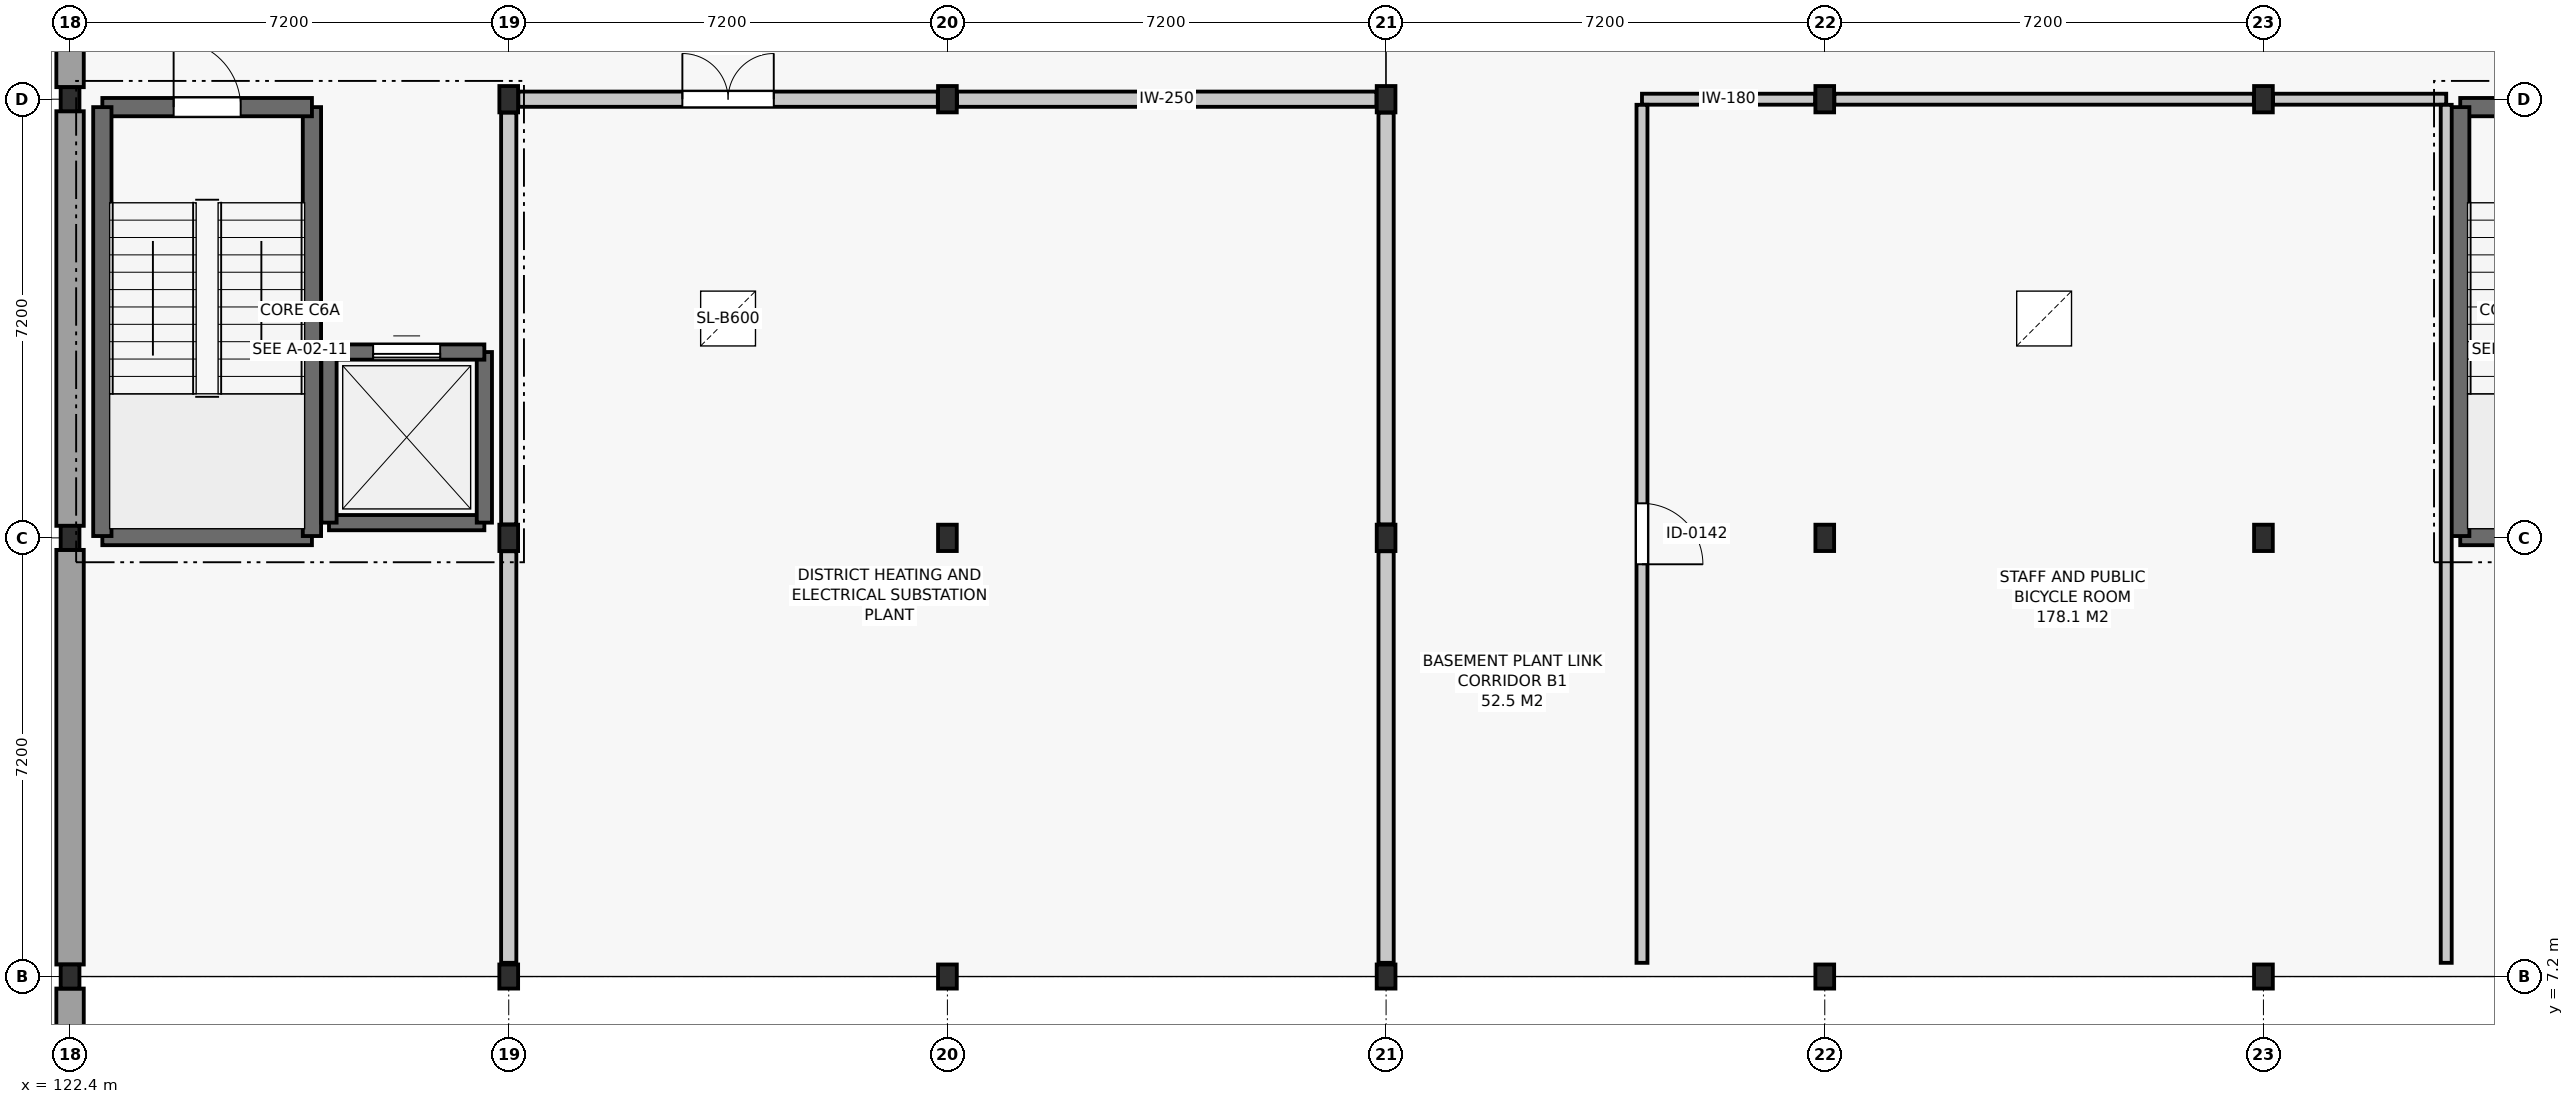
"""IFC4 building model, lengths in metres.
Left out: names, types, materials, properties, quantities, classifications, styles, units other than length and angle.
Written with IfcOpenShell. Run it as: python <this file> out.ifc"""

import sys

from ifc_helpers import new_model, si_unit, direction, frame, frame_2d, origin, origin_2d, place, context, subcontext, project, spatial, rectangle, i_section, extrude, element, fill, save


model = new_model("IFC4")
c1 = context("Model", 3, precision=1e-05, world=origin(), true_north=direction((0.0, 1.0)))
c2 = subcontext(c1, "Body", "Model", "MODEL_VIEW")
j1 = project(units=[si_unit("LENGTHUNIT", "METRE"), si_unit("PLANEANGLEUNIT", "RADIAN")], contexts=[c1])
p1 = place(None, origin())
s1 = spatial("IfcSite", under=j1, at=p1, CompositionType="ELEMENT")
p2 = place(p1, origin())
s2 = spatial("IfcBuilding", under=s1, at=p2, CompositionType="ELEMENT")
p3 = place(p2, frame((0.0, 0.0, -4.2)))
s3 = spatial("IfcBuildingStorey", under=s2, at=p3, CompositionType="ELEMENT", Elevation=-4.2)
for number, where, z_axis, x_axis in (
    (1, (122.4, 7.2, 0.0), (0.0, 0.0, 1.0), (1.0, 0.0, 0.0)),
    (2, (122.4, 14.4, 0.0), (0.0, 0.0, 1.0), (1.0, 0.0, 0.0)),
    (3, (122.4, 21.6, 0.0), (0.0, 0.0, 1.0), (1.0, 0.0, 0.0)),
    (4, (129.6, 7.2, 0.0), (0.0, 0.0, 1.0), (1.0, 0.0, 0.0)),
):
    element("IfcColumn", number, at=place(p3, frame(where, z_axis=z_axis, x_axis=x_axis)), inside=s3, PredefinedType="COLUMN", context=c2, shape_type="SweptSolid", body=[
        extrude(i_section(OverallWidth=0.308, OverallDepth=0.395, WebThickness=0.021, FlangeThickness=0.036, FilletRadius=0.027, at=origin_2d()), origin(), (0.0, 0.0, 1.0), 4.2),
    ])
for number, where, z_axis, x_axis in (
    (5, (129.6, 14.4, 0.0), (0.0, 0.0, 1.0), (1.0, 0.0, 0.0)),
    (6, (129.6, 21.6, 0.0), (0.0, 0.0, 1.0), (1.0, 0.0, 0.0)),
):
    element("IfcColumn", number, at=place(p3, frame(where, z_axis=z_axis, x_axis=x_axis)), inside=s3, PredefinedType="COLUMN", context=c2, shape_type="SweptSolid", body=[
        extrude(i_section(OverallWidth=0.307, OverallDepth=0.432, WebThickness=0.021, FlangeThickness=0.04, FilletRadius=0.027, at=origin_2d()), origin(), (0.0, 0.0, 1.0), 4.2),
    ])
p4 = place(p3, frame((136.8, 7.2, 0.0), z_axis=(0.0, 0.0, 1.0), x_axis=(1.0, 0.0, 0.0)))
e7 = element("IfcColumn", 7, at=p4, inside=s3, PredefinedType="COLUMN", context=c2, shape_type="SweptSolid", body=[
    extrude(i_section(OverallWidth=0.308, OverallDepth=0.395, WebThickness=0.021, FlangeThickness=0.036, FilletRadius=0.027, at=origin_2d()), origin(), (0.0, 0.0, 1.0), 4.2),
])
for number, where, z_axis, x_axis in (
    (8, (136.8, 14.4, 0.0), (0.0, 0.0, 1.0), (1.0, 0.0, 0.0)),
    (9, (136.8, 21.6, 0.0), (0.0, 0.0, 1.0), (1.0, 0.0, 0.0)),
):
    element("IfcColumn", number, at=place(p3, frame(where, z_axis=z_axis, x_axis=x_axis)), inside=s3, PredefinedType="COLUMN", context=c2, shape_type="SweptSolid", body=[
        extrude(i_section(OverallWidth=0.307, OverallDepth=0.432, WebThickness=0.021, FlangeThickness=0.04, FilletRadius=0.027, at=origin_2d()), origin(), (0.0, 0.0, 1.0), 4.2),
    ])
p5 = place(p3, frame((144.0, 7.2, 0.0), z_axis=(0.0, 0.0, 1.0), x_axis=(1.0, 0.0, 0.0)))
e10 = element("IfcColumn", 10, at=p5, inside=s3, PredefinedType="COLUMN", context=c2, shape_type="SweptSolid", body=[
    extrude(i_section(OverallWidth=0.308, OverallDepth=0.395, WebThickness=0.021, FlangeThickness=0.036, FilletRadius=0.027, at=origin_2d()), origin(), (0.0, 0.0, 1.0), 4.2),
])
for number, where, z_axis, x_axis in (
    (11, (144.0, 14.4, 0.0), (0.0, 0.0, 1.0), (1.0, 0.0, 0.0)),
    (12, (144.0, 21.6, 0.0), (0.0, 0.0, 1.0), (1.0, 0.0, 0.0)),
):
    element("IfcColumn", number, at=place(p3, frame(where, z_axis=z_axis, x_axis=x_axis)), inside=s3, PredefinedType="COLUMN", context=c2, shape_type="SweptSolid", body=[
        extrude(i_section(OverallWidth=0.307, OverallDepth=0.432, WebThickness=0.021, FlangeThickness=0.04, FilletRadius=0.027, at=origin_2d()), origin(), (0.0, 0.0, 1.0), 4.2),
    ])
p6 = place(p3, frame((151.2, 7.2, 0.0), z_axis=(0.0, 0.0, 1.0), x_axis=(1.0, 0.0, 0.0)))
e13 = element("IfcColumn", 13, at=p6, inside=s3, PredefinedType="COLUMN", context=c2, shape_type="SweptSolid", body=[
    extrude(i_section(OverallWidth=0.308, OverallDepth=0.395, WebThickness=0.021, FlangeThickness=0.036, FilletRadius=0.027, at=origin_2d()), origin(), (0.0, 0.0, 1.0), 4.2),
])
for number, where, z_axis, x_axis in (
    (14, (151.2, 14.4, 0.0), (0.0, 0.0, 1.0), (1.0, 0.0, 0.0)),
    (15, (151.2, 21.6, 0.0), (0.0, 0.0, 1.0), (1.0, 0.0, 0.0)),
):
    element("IfcColumn", number, at=place(p3, frame(where, z_axis=z_axis, x_axis=x_axis)), inside=s3, PredefinedType="COLUMN", context=c2, shape_type="SweptSolid", body=[
        extrude(i_section(OverallWidth=0.307, OverallDepth=0.432, WebThickness=0.021, FlangeThickness=0.04, FilletRadius=0.027, at=origin_2d()), origin(), (0.0, 0.0, 1.0), 4.2),
    ])
p7 = place(p3, frame((158.4, 7.2, 0.0), z_axis=(0.0, 0.0, 1.0), x_axis=(1.0, 0.0, 0.0)))
e16 = element("IfcColumn", 16, at=p7, inside=s3, PredefinedType="COLUMN", context=c2, shape_type="SweptSolid", body=[
    extrude(i_section(OverallWidth=0.308, OverallDepth=0.395, WebThickness=0.021, FlangeThickness=0.036, FilletRadius=0.027, at=origin_2d()), origin(), (0.0, 0.0, 1.0), 4.2),
])
for number, where, z_axis, x_axis in (
    (17, (158.4, 14.4, 0.0), (0.0, 0.0, 1.0), (1.0, 0.0, 0.0)),
    (18, (158.4, 21.6, 0.0), (0.0, 0.0, 1.0), (1.0, 0.0, 0.0)),
):
    element("IfcColumn", number, at=place(p3, frame(where, z_axis=z_axis, x_axis=x_axis)), inside=s3, PredefinedType="COLUMN", context=c2, shape_type="SweptSolid", body=[
        extrude(i_section(OverallWidth=0.307, OverallDepth=0.432, WebThickness=0.021, FlangeThickness=0.04, FilletRadius=0.027, at=origin_2d()), origin(), (0.0, 0.0, 1.0), 4.2),
    ])
p8 = place(p3, frame((122.4, 0.198, -0.68), z_axis=(0.0, 0.0, 1.0), x_axis=(0.0, 1.0, 0.0)))
e19 = element("IfcWall", 19, at=p8, inside=s3, PredefinedType="USERDEFINED", context=c2, shape_type="SweptSolid", body=[
    extrude(rectangle(XDim=6.805, YDim=0.45, at=frame_2d((3.402, 0.0))), origin(), (0.0, 0.0, 1.0), 3.94),
])
p9 = place(p3, frame((122.4, 7.397, 0.0), z_axis=(0.0, 0.0, 1.0), x_axis=(0.0, 1.0, 0.0)))
e20 = element("IfcWall", 20, at=p9, inside=s3, PredefinedType="USERDEFINED", context=c2, shape_type="SweptSolid", body=[
    extrude(rectangle(XDim=6.805, YDim=0.45, at=frame_2d((3.402, 0.0))), origin(), (0.0, 0.0, 1.0), 3.26),
])
p10 = place(p3, frame((122.4, 14.597, 0.0), z_axis=(0.0, 0.0, 1.0), x_axis=(0.0, 1.0, 0.0)))
e21 = element("IfcWall", 21, at=p10, inside=s3, PredefinedType="USERDEFINED", context=c2, shape_type="SweptSolid", body=[
    extrude(rectangle(XDim=6.805, YDim=0.45, at=frame_2d((3.403, 0.0))), origin(), (0.0, 0.0, 1.0), 3.26),
])
p11 = place(p3, frame((122.4, 21.798, 0.0), z_axis=(0.0, 0.0, 1.0), x_axis=(0.0, 1.0, 0.0)))
e22 = element("IfcWall", 22, at=p11, inside=s3, PredefinedType="USERDEFINED", context=c2, shape_type="SweptSolid", body=[
    extrude(rectangle(XDim=6.805, YDim=0.45, at=frame_2d((3.402, 0.0))), origin(), (0.0, 0.0, 1.0), 3.26),
])
p12 = place(p3, frame((122.93, 14.43, 0.0), z_axis=(0.0, 0.0, 1.0), x_axis=(1.0, 0.0, 0.0)))
e23 = element("IfcWall", 23, at=p12, inside=s3, PredefinedType="SHEAR", context=c2, shape_type="SweptSolid", body=[
    extrude(rectangle(XDim=3.44, YDim=0.3, at=frame_2d((1.72, 0.0))), origin(), (0.0, 0.0, 1.0), 3.88),
])
p13 = place(p3, frame((126.37, 14.43, 0.0), z_axis=(0.0, 0.0, 1.0), x_axis=(0.0, 1.0, 0.0)))
e24 = element("IfcWall", 24, at=p13, inside=s3, PredefinedType="SHEAR", context=c2, shape_type="SweptSolid", body=[
    extrude(rectangle(XDim=7.04, YDim=0.3, at=frame_2d((3.52, 0.0))), origin(), (0.0, 0.0, 1.0), 3.88),
])
p14 = place(p3, frame((126.37, 21.47, 0.0), z_axis=(0.0, 0.0, 1.0), x_axis=(-1.0, 0.0, 0.0)))
e25 = element("IfcWall", 25, at=p14, inside=s3, PredefinedType="SHEAR", context=c2, shape_type="SweptSolid", body=[
    extrude(rectangle(XDim=3.44, YDim=0.3, at=frame_2d((1.72, 0.0))), origin(), (0.0, 0.0, 1.0), 3.88),
])
p15 = place(p14, frame((1.17, 0.0, 0.0)))
e26 = element("IfcOpeningElement", 26, at=p15, cuts=e25, PredefinedType="OPENING", context=c2, shape_type="SweptSolid", body=[
    extrude(rectangle(XDim=1.1, YDim=2.15, at=frame_2d((0.55, 1.075))), frame((0.0, 0.162, 0.0), z_axis=(0.0, -1.0, 0.0), x_axis=(1.0, 0.0, 0.0)), (0.0, 0.0, 1.0), 0.324),
])
p16 = place(p3, frame((122.93, 21.47, 0.0), z_axis=(0.0, 0.0, 1.0), x_axis=(0.0, -1.0, 0.0)))
e27 = element("IfcWall", 27, at=p16, inside=s3, PredefinedType="SHEAR", context=c2, shape_type="SweptSolid", body=[
    extrude(rectangle(XDim=7.04, YDim=0.3, at=frame_2d((3.52, 0.0))), origin(), (0.0, 0.0, 1.0), 3.88),
])
p17 = place(p3, frame((126.65, 14.65, 0.0), z_axis=(0.0, 0.0, 1.0), x_axis=(1.0, 0.0, 0.0)))
e28 = element("IfcWall", 28, at=p17, inside=s3, PredefinedType="SHEAR", context=c2, shape_type="SweptSolid", body=[
    extrude(rectangle(XDim=2.55, YDim=0.25, at=frame_2d((1.275, 0.0))), origin(), (0.0, 0.0, 1.0), 3.88),
])
p18 = place(p3, frame((129.2, 14.65, 0.0), z_axis=(0.0, 0.0, 1.0), x_axis=(0.0, 1.0, 0.0)))
e29 = element("IfcWall", 29, at=p18, inside=s3, PredefinedType="SHEAR", context=c2, shape_type="SweptSolid", body=[
    extrude(rectangle(XDim=2.8, YDim=0.25, at=frame_2d((1.4, 0.0))), origin(), (0.0, 0.0, 1.0), 3.88),
])
p19 = place(p3, frame((129.2, 17.45, 0.0), z_axis=(0.0, 0.0, 1.0), x_axis=(-1.0, 0.0, 0.0)))
e30 = element("IfcWall", 30, at=p19, inside=s3, PredefinedType="SHEAR", context=c2, shape_type="SweptSolid", body=[
    extrude(rectangle(XDim=2.55, YDim=0.25, at=frame_2d((1.275, 0.0))), origin(), (0.0, 0.0, 1.0), 3.88),
])
p20 = place(p19, frame((0.725, 0.0, 0.0)))
e31 = element("IfcOpeningElement", 31, at=p20, cuts=e30, PredefinedType="OPENING", context=c2, shape_type="SweptSolid", body=[
    extrude(rectangle(XDim=1.1, YDim=2.1, at=frame_2d((0.55, 1.05))), frame((0.0, 0.137, 0.0), z_axis=(0.0, -1.0, 0.0), x_axis=(1.0, 0.0, 0.0)), (0.0, 0.0, 1.0), 0.274),
])
p21 = place(p3, frame((126.65, 17.45, 0.0), z_axis=(0.0, 0.0, 1.0), x_axis=(0.0, -1.0, 0.0)))
e32 = element("IfcWall", 32, at=p21, inside=s3, PredefinedType="SHEAR", context=c2, shape_type="SweptSolid", body=[
    extrude(rectangle(XDim=2.8, YDim=0.25, at=frame_2d((1.4, 0.0))), origin(), (0.0, 0.0, 1.0), 3.88),
])
p22 = place(p3, frame((161.63, 14.43, 0.0), z_axis=(0.0, 0.0, 1.0), x_axis=(1.0, 0.0, 0.0)))
e33 = element("IfcWall", 33, at=p22, inside=s3, PredefinedType="SHEAR", context=c2, shape_type="SweptSolid", body=[
    extrude(rectangle(XDim=3.44, YDim=0.3, at=frame_2d((1.72, 0.0))), origin(), (0.0, 0.0, 1.0), 3.88),
])
p23 = place(p3, frame((165.07, 21.47, 0.0), z_axis=(0.0, 0.0, 1.0), x_axis=(-1.0, 0.0, 0.0)))
e34 = element("IfcWall", 34, at=p23, inside=s3, PredefinedType="SHEAR", context=c2, shape_type="SweptSolid", body=[
    extrude(rectangle(XDim=3.44, YDim=0.3, at=frame_2d((1.72, 0.0))), origin(), (0.0, 0.0, 1.0), 3.88),
])
p24 = place(p23, frame((1.17, 0.0, 0.0)))
e35 = element("IfcOpeningElement", 35, at=p24, cuts=e34, PredefinedType="OPENING", context=c2, shape_type="SweptSolid", body=[
    extrude(rectangle(XDim=1.1, YDim=2.15, at=frame_2d((0.55, 1.075))), frame((0.0, 0.162, 0.0), z_axis=(0.0, -1.0, 0.0), x_axis=(1.0, 0.0, 0.0)), (0.0, 0.0, 1.0), 0.324),
])
p25 = place(p3, frame((161.63, 21.47, 0.0), z_axis=(0.0, 0.0, 1.0), x_axis=(0.0, -1.0, 0.0)))
e36 = element("IfcWall", 36, at=p25, inside=s3, PredefinedType="SHEAR", context=c2, shape_type="SweptSolid", body=[
    extrude(rectangle(XDim=7.04, YDim=0.3, at=frame_2d((3.52, 0.0))), origin(), (0.0, 0.0, 1.0), 3.88),
])
p26 = place(p3, frame((148.2, 21.6, 0.0), z_axis=(0.0, 0.0, 1.0), x_axis=(1.0, 0.0, 0.0)))
e37 = element("IfcWall", 37, at=p26, inside=s3, PredefinedType="PARTITIONING", context=c2, shape_type="SweptSolid", body=[
    extrude(rectangle(XDim=2.843, YDim=0.18, at=frame_2d((1.421, 0.0))), origin(), (0.0, 0.0, 1.0), 3.465),
])
p27 = place(p3, frame((151.357, 21.6, 0.0), z_axis=(0.0, 0.0, 1.0), x_axis=(1.0, 0.0, 0.0)))
e38 = element("IfcWall", 38, at=p27, inside=s3, PredefinedType="PARTITIONING", context=c2, shape_type="SweptSolid", body=[
    extrude(rectangle(XDim=6.885, YDim=0.18, at=frame_2d((3.442, 0.0))), origin(), (0.0, 0.0, 1.0), 3.465),
])
p28 = place(p3, frame((158.558, 21.6, 0.0), z_axis=(0.0, 0.0, 1.0), x_axis=(1.0, 0.0, 0.0)))
e39 = element("IfcWall", 39, at=p28, inside=s3, PredefinedType="PARTITIONING", context=c2, shape_type="SweptSolid", body=[
    extrude(rectangle(XDim=2.842, YDim=0.18, at=frame_2d((1.421, 0.0))), origin(), (0.0, 0.0, 1.0), 3.465),
])
p29 = place(p3, frame((129.758, 21.6, 0.0), z_axis=(0.0, 0.0, 1.0), x_axis=(1.0, 0.0, 0.0)))
e40 = element("IfcWall", 40, at=p29, inside=s3, PredefinedType="SOLIDWALL", context=c2, shape_type="SweptSolid", body=[
    extrude(rectangle(XDim=6.885, YDim=0.25, at=frame_2d((3.442, 0.0))), origin(), (0.0, 0.0, 1.0), 3.465),
])
p30 = place(p29, frame((2.692, 0.0, 0.0)))
e41 = element("IfcOpeningElement", 41, at=p30, cuts=e40, PredefinedType="OPENING", context=c2, shape_type="SweptSolid", body=[
    extrude(rectangle(XDim=1.5, YDim=2.2, at=frame_2d((0.75, 1.1))), frame((0.0, 0.137, 0.0), z_axis=(0.0, -1.0, 0.0), x_axis=(1.0, 0.0, 0.0)), (0.0, 0.0, 1.0), 0.274),
])
p31 = place(p3, frame((136.958, 21.6, 0.0), z_axis=(0.0, 0.0, 1.0), x_axis=(1.0, 0.0, 0.0)))
e42 = element("IfcWall", 42, at=p31, inside=s3, PredefinedType="SOLIDWALL", context=c2, shape_type="SweptSolid", body=[
    extrude(rectangle(XDim=6.885, YDim=0.25, at=frame_2d((3.442, 0.0))), origin(), (0.0, 0.0, 1.0), 3.465),
])
p32 = place(p3, frame((148.2, 7.425, 0.0), z_axis=(0.0, 0.0, 1.0), x_axis=(0.0, 1.0, 0.0)))
e43 = element("IfcWall", 43, at=p32, inside=s3, PredefinedType="PARTITIONING", context=c2, shape_type="SweptSolid", body=[
    extrude(rectangle(XDim=14.083, YDim=0.18, at=frame_2d((7.042, 0.0))), origin(), (0.0, 0.0, 1.0), 3.465),
])
p33 = place(p32, frame((6.542, 0.0, 0.0)))
e44 = element("IfcOpeningElement", 44, at=p33, cuts=e43, PredefinedType="OPENING", context=c2, shape_type="SweptSolid", body=[
    extrude(rectangle(XDim=1.0, YDim=2.15, at=frame_2d((0.5, 1.075))), frame((0.0, 0.102, 0.0), z_axis=(0.0, -1.0, 0.0), x_axis=(1.0, 0.0, 0.0)), (0.0, 0.0, 1.0), 0.204),
])
p34 = place(p3, frame((161.4, 7.425, 0.0), z_axis=(0.0, 0.0, 1.0), x_axis=(0.0, 1.0, 0.0)))
e45 = element("IfcWall", 45, at=p34, inside=s3, PredefinedType="PARTITIONING", context=c2, shape_type="SweptSolid", body=[
    extrude(rectangle(XDim=14.083, YDim=0.18, at=frame_2d((7.042, 0.0))), origin(), (0.0, 0.0, 1.0), 3.465),
])
p35 = place(p3, frame((129.6, 7.425, 0.0), z_axis=(0.0, 0.0, 1.0), x_axis=(0.0, 1.0, 0.0)))
e46 = element("IfcWall", 46, at=p35, inside=s3, PredefinedType="SOLIDWALL", context=c2, shape_type="SweptSolid", body=[
    extrude(rectangle(XDim=6.755, YDim=0.25, at=frame_2d((3.377, 0.0))), origin(), (0.0, 0.0, 1.0), 3.425),
])
p36 = place(p3, frame((129.6, 14.62, 0.0), z_axis=(0.0, 0.0, 1.0), x_axis=(0.0, 1.0, 0.0)))
e47 = element("IfcWall", 47, at=p36, inside=s3, PredefinedType="SOLIDWALL", context=c2, shape_type="SweptSolid", body=[
    extrude(rectangle(XDim=6.76, YDim=0.25, at=frame_2d((3.38, 0.0))), origin(), (0.0, 0.0, 1.0), 3.425),
])
p37 = place(p3, frame((144.0, 7.425, 0.0), z_axis=(0.0, 0.0, 1.0), x_axis=(0.0, 1.0, 0.0)))
e48 = element("IfcWall", 48, at=p37, inside=s3, PredefinedType="SOLIDWALL", context=c2, shape_type="SweptSolid", body=[
    extrude(rectangle(XDim=6.755, YDim=0.25, at=frame_2d((3.377, 0.0))), origin(), (0.0, 0.0, 1.0), 3.425),
])
p38 = place(p3, frame((144.0, 14.62, 0.0), z_axis=(0.0, 0.0, 1.0), x_axis=(0.0, 1.0, 0.0)))
e49 = element("IfcWall", 49, at=p38, inside=s3, PredefinedType="SOLIDWALL", context=c2, shape_type="SweptSolid", body=[
    extrude(rectangle(XDim=6.76, YDim=0.25, at=frame_2d((3.38, 0.0))), origin(), (0.0, 0.0, 1.0), 3.425),
])
p39 = place(p15, frame((1.1, 0.0, 0.0), z_axis=(0.0, 0.0, 1.0), x_axis=(-1.0, 0.0, 0.0)))
e50 = element("IfcDoor", 50, at=p39, inside=s3, OperationType="SINGLE_SWING_LEFT", PredefinedType="DOOR", context=c2, shape_type="SweptSolid", body=[
    extrude(rectangle(XDim=1.1, YDim=2.15, at=frame_2d((0.55, 1.075))), frame((0.0, 0.025, 0.0), z_axis=(0.0, -1.0, 0.0), x_axis=(1.0, 0.0, 0.0)), (0.0, 0.0, 1.0), 0.05),
])
fill(e26, e50)
p40 = place(p20, origin())
e51 = element("IfcDoor", 51, at=p40, inside=s3, OperationType="SLIDING_TO_LEFT", PredefinedType="DOOR", context=c2, shape_type="SweptSolid", body=[
    extrude(rectangle(XDim=1.1, YDim=2.1, at=frame_2d((0.55, 1.05))), frame((0.0, 0.025, 0.0), z_axis=(0.0, -1.0, 0.0), x_axis=(1.0, 0.0, 0.0)), (0.0, 0.0, 1.0), 0.05),
])
fill(e31, e51)
p41 = place(p33, frame((1.0, 0.0, 0.0), z_axis=(0.0, 0.0, 1.0), x_axis=(-1.0, 0.0, 0.0)))
e52 = element("IfcDoor", 52, at=p41, inside=s3, OperationType="SINGLE_SWING_RIGHT", PredefinedType="DOOR", context=c2, shape_type="SweptSolid", body=[
    extrude(rectangle(XDim=1.0, YDim=2.15, at=frame_2d((0.5, 1.075))), frame((0.0, 0.025, 0.0), z_axis=(0.0, -1.0, 0.0), x_axis=(1.0, 0.0, 0.0)), (0.0, 0.0, 1.0), 0.05),
])
fill(e44, e52)
p42 = place(p30, origin())
e53 = element("IfcDoor", 53, at=p42, inside=s3, OperationType="DOUBLE_DOOR_SINGLE_SWING", PredefinedType="DOOR", context=c2, shape_type="SweptSolid", body=[
    extrude(rectangle(XDim=1.5, YDim=2.2, at=frame_2d((0.75, 1.1))), frame((0.0, 0.025, 0.0), z_axis=(0.0, -1.0, 0.0), x_axis=(1.0, 0.0, 0.0)), (0.0, 0.0, 1.0), 0.05),
])
fill(e41, e53)
save(model, sys.argv[1])
